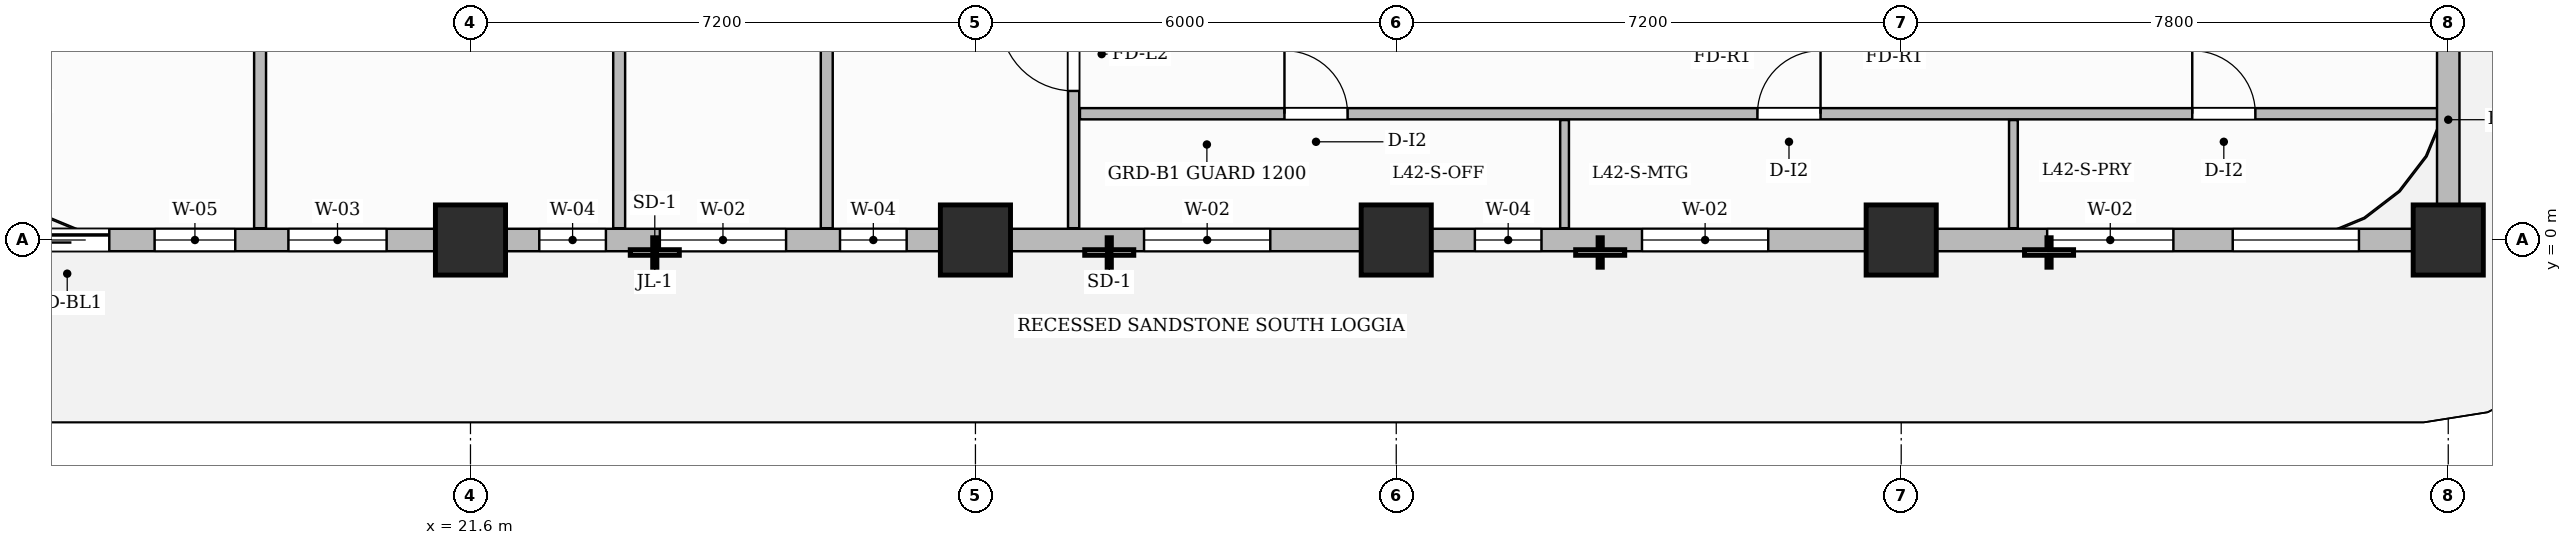
"""IFC4 building model, lengths in metres.
Left out: names, types, materials, properties, quantities, classifications, styles, units other than length and angle.
Written with IfcOpenShell. Run it as: python <this file> out.ifc"""

import sys

from ifc_helpers import new_model, si_unit, direction, frame, frame_2d, origin, origin_2d, place, context, subcontext, project, spatial, rectangle, extrude, source, transform, mapped, element, fill, save


model = new_model("IFC4")
c1 = context("Model", 3, precision=1e-05, world=origin(), true_north=direction((0.0, 1.0)))
c2 = subcontext(c1, "Body", "Model", "MODEL_VIEW")
j1 = project(units=[si_unit("LENGTHUNIT", "METRE"), si_unit("PLANEANGLEUNIT", "RADIAN")], contexts=[c1])
p1 = place(None, origin())
s1 = spatial("IfcSite", under=j1, at=p1, CompositionType="ELEMENT")
p2 = place(p1, origin())
s2 = spatial("IfcBuilding", under=s1, at=p2, CompositionType="ELEMENT")
p3 = place(p2, frame((0.0, 0.0, 169.55)))
s3 = spatial("IfcBuildingStorey", under=s2, at=p3, CompositionType="ELEMENT", Elevation=169.55)
m1 = source(origin(), c2, "Body", "SweptSolid", [
    extrude(rectangle(XDim=1.0, YDim=1.0, at=origin_2d()), origin(), (0.0, 0.0, 1.0), 3.85),
])
for number, where, z_axis, x_axis in (
    (1, (21.6, 0.0, 0.0), (0.0, 0.0, 1.0), (1.0, 0.0, 0.0)),
    (2, (28.8, 0.0, 0.0), (0.0, 0.0, 1.0), (1.0, 0.0, 0.0)),
    (3, (34.8, 0.0, 0.0), (0.0, 0.0, 1.0), (1.0, 0.0, 0.0)),
    (4, (42.0, 0.0, 0.0), (0.0, 0.0, 1.0), (1.0, 0.0, 0.0)),
    (5, (49.8, 0.0, 0.0), (0.0, 0.0, 1.0), (1.0, 0.0, 0.0)),
):
    element("IfcColumn", number, at=place(p3, frame(where, z_axis=z_axis, x_axis=x_axis)), inside=s3, PredefinedType="COLUMN", context=c2, shape_type="MappedRepresentation", body=[
        mapped(m1, transform((0.0, 0.0, 0.0), scale=1.0)),
    ])
p4 = place(p3, frame((30.2, 0.168, 0.0), z_axis=(0.0, 0.0, 1.0), x_axis=(0.0, 1.0, 0.0)))
e6 = element("IfcWall", 6, at=p4, inside=s3, PredefinedType="PARTITIONING", context=c2, shape_type="SweptSolid", body=[
    extrude(rectangle(XDim=8.892, YDim=0.16, at=frame_2d((4.446, 0.0))), origin(), (0.0, 0.0, 1.0), 3.6),
])
p5 = place(p4, frame((1.957, 0.0, 0.0)))
e7 = element("IfcOpeningElement", 7, at=p5, cuts=e6, PredefinedType="OPENING", context=c2, shape_type="SweptSolid", body=[
    extrude(rectangle(XDim=1.05, YDim=2.15, at=frame_2d((0.525, 1.075))), frame((0.0, 0.09, 0.0), z_axis=(0.0, -1.0, 0.0), x_axis=(1.0, 0.0, 0.0)), (0.0, 0.0, 1.0), 0.18),
])
p6 = place(p3, frame((30.29, 1.8, 0.0), z_axis=(0.0, 0.0, 1.0), x_axis=(1.0, 0.0, 0.0)))
e8 = element("IfcWall", 8, at=p6, inside=s3, PredefinedType="PARTITIONING", context=c2, shape_type="SweptSolid", body=[
    extrude(rectangle(XDim=19.37, YDim=0.16, at=frame_2d((9.685, 0.0))), origin(), (0.0, 0.0, 1.0), 3.6),
])
p7 = place(p6, frame((2.916, 0.0, 0.0)))
e9 = element("IfcOpeningElement", 9, at=p7, cuts=e8, PredefinedType="OPENING", context=c2, shape_type="SweptSolid", body=[
    extrude(rectangle(XDim=0.9, YDim=2.15, at=frame_2d((0.45, 1.075))), frame((0.0, 0.09, 0.0), z_axis=(0.0, -1.0, 0.0), x_axis=(1.0, 0.0, 0.0)), (0.0, 0.0, 1.0), 0.18),
])
p8 = place(p6, frame((9.66, 0.0, 0.0)))
e10 = element("IfcOpeningElement", 10, at=p8, cuts=e8, PredefinedType="OPENING", context=c2, shape_type="SweptSolid", body=[
    extrude(rectangle(XDim=0.9, YDim=2.15, at=frame_2d((0.45, 1.075))), frame((0.0, 0.09, 0.0), z_axis=(0.0, -1.0, 0.0), x_axis=(1.0, 0.0, 0.0)), (0.0, 0.0, 1.0), 0.18),
])
p9 = place(p6, frame((15.86, 0.0, 0.0)))
e11 = element("IfcOpeningElement", 11, at=p9, cuts=e8, PredefinedType="OPENING", context=c2, shape_type="SweptSolid", body=[
    extrude(rectangle(XDim=0.9, YDim=2.15, at=frame_2d((0.45, 1.075))), frame((0.0, 0.09, 0.0), z_axis=(0.0, -1.0, 0.0), x_axis=(1.0, 0.0, 0.0)), (0.0, 0.0, 1.0), 0.18),
])
for number, where, z_axis, x_axis in (
    (12, (37.2, 0.168, 0.0), (0.0, 0.0, 1.0), (0.0, 1.0, 0.0)),
    (13, (43.6, 0.168, 0.0), (0.0, 0.0, 1.0), (0.0, 1.0, 0.0)),
):
    element("IfcWall", number, at=place(p3, frame(where, z_axis=z_axis, x_axis=x_axis)), inside=s3, PredefinedType="PARTITIONING", context=c2, shape_type="SweptSolid", body=[
        extrude(rectangle(XDim=1.542, YDim=0.125, at=frame_2d((0.771, 0.0))), origin(), (0.0, 0.0, 1.0), 3.6),
    ])
for number, where, z_axis, x_axis in (
    (14, (18.6, 0.168, 0.0), (0.0, 0.0, 1.0), (0.0, 1.0, 0.0)),
    (15, (23.72, 0.168, 0.0), (0.0, 0.0, 1.0), (0.0, 1.0, 0.0)),
    (16, (26.68, 0.168, 0.0), (0.0, 0.0, 1.0), (0.0, 1.0, 0.0)),
):
    element("IfcWall", number, at=place(p3, frame(where, z_axis=z_axis, x_axis=x_axis)), inside=s3, PredefinedType="PARTITIONING", context=c2, shape_type="SweptSolid", body=[
        extrude(rectangle(XDim=8.892, YDim=0.17, at=frame_2d((4.446, 0.0))), origin(), (0.0, 0.0, 1.0), 3.6),
    ])
p10 = place(p3, frame((14.4, 0.0, 0.0), z_axis=(0.0, 0.0, 1.0), x_axis=(1.0, 0.0, 0.0)))
e17 = element("IfcWall", 17, at=p10, inside=s3, PredefinedType="SOLIDWALL", context=c2, shape_type="SweptSolid", body=[
    extrude(rectangle(XDim=35.4, YDim=0.32, at=frame_2d((17.7, 0.0))), origin(), (0.0, 0.0, 1.0), 3.085),
])
p11 = place(p10, frame((0.85, 0.0, 0.0)))
e18 = element("IfcOpeningElement", 18, at=p11, cuts=e17, PredefinedType="OPENING", context=c2, shape_type="SweptSolid", body=[
    extrude(rectangle(XDim=1.2, YDim=2.2, at=frame_2d((0.6, 1.1))), frame((0.0, 0.17, 0.0), z_axis=(0.0, -1.0, 0.0), x_axis=(1.0, 0.0, 0.0)), (0.0, 0.0, 1.0), 0.34),
])
p12 = place(p10, frame((2.696, 0.0, 0.8)))
e19 = element("IfcOpeningElement", 19, at=p12, cuts=e17, PredefinedType="OPENING", context=c2, shape_type="SweptSolid", body=[
    extrude(rectangle(XDim=1.15, YDim=1.8, at=frame_2d((0.575, 0.9))), frame((0.0, 0.17, 0.0), z_axis=(0.0, -1.0, 0.0), x_axis=(1.0, 0.0, 0.0)), (0.0, 0.0, 1.0), 0.34),
])
p13 = place(p10, frame((4.604, 0.0, 0.8)))
e20 = element("IfcOpeningElement", 20, at=p13, cuts=e17, PredefinedType="OPENING", context=c2, shape_type="SweptSolid", body=[
    extrude(rectangle(XDim=1.4, YDim=1.85, at=frame_2d((0.7, 0.925))), frame((0.0, 0.17, 0.0), z_axis=(0.0, -1.0, 0.0), x_axis=(1.0, 0.0, 0.0)), (0.0, 0.0, 1.0), 0.34),
])
p14 = place(p10, frame((8.181, 0.0, 0.8)))
e21 = element("IfcOpeningElement", 21, at=p14, cuts=e17, PredefinedType="OPENING", context=c2, shape_type="SweptSolid", body=[
    extrude(rectangle(XDim=0.95, YDim=1.75, at=frame_2d((0.475, 0.875))), frame((0.0, 0.17, 0.0), z_axis=(0.0, -1.0, 0.0), x_axis=(1.0, 0.0, 0.0)), (0.0, 0.0, 1.0), 0.34),
])
p15 = place(p10, frame((9.9, 0.0, 0.8)))
e22 = element("IfcOpeningElement", 22, at=p15, cuts=e17, PredefinedType="OPENING", context=c2, shape_type="SweptSolid", body=[
    extrude(rectangle(XDim=1.8, YDim=1.85, at=frame_2d((0.9, 0.925))), frame((0.0, 0.17, 0.0), z_axis=(0.0, -1.0, 0.0), x_axis=(1.0, 0.0, 0.0)), (0.0, 0.0, 1.0), 0.34),
])
p16 = place(p10, frame((12.469, 0.0, 0.8)))
e23 = element("IfcOpeningElement", 23, at=p16, cuts=e17, PredefinedType="OPENING", context=c2, shape_type="SweptSolid", body=[
    extrude(rectangle(XDim=0.95, YDim=1.75, at=frame_2d((0.475, 0.875))), frame((0.0, 0.17, 0.0), z_axis=(0.0, -1.0, 0.0), x_axis=(1.0, 0.0, 0.0)), (0.0, 0.0, 1.0), 0.34),
])
p17 = place(p10, frame((16.804, 0.0, 0.8)))
e24 = element("IfcOpeningElement", 24, at=p17, cuts=e17, PredefinedType="OPENING", context=c2, shape_type="SweptSolid", body=[
    extrude(rectangle(XDim=1.8, YDim=1.85, at=frame_2d((0.9, 0.925))), frame((0.0, 0.17, 0.0), z_axis=(0.0, -1.0, 0.0), x_axis=(1.0, 0.0, 0.0)), (0.0, 0.0, 1.0), 0.34),
])
p18 = place(p10, frame((21.521, 0.0, 0.8)))
e25 = element("IfcOpeningElement", 25, at=p18, cuts=e17, PredefinedType="OPENING", context=c2, shape_type="SweptSolid", body=[
    extrude(rectangle(XDim=0.95, YDim=1.75, at=frame_2d((0.475, 0.875))), frame((0.0, 0.17, 0.0), z_axis=(0.0, -1.0, 0.0), x_axis=(1.0, 0.0, 0.0)), (0.0, 0.0, 1.0), 0.34),
])
p19 = place(p10, frame((23.904, 0.0, 0.8)))
e26 = element("IfcOpeningElement", 26, at=p19, cuts=e17, PredefinedType="OPENING", context=c2, shape_type="SweptSolid", body=[
    extrude(rectangle(XDim=1.8, YDim=1.85, at=frame_2d((0.9, 0.925))), frame((0.0, 0.17, 0.0), z_axis=(0.0, -1.0, 0.0), x_axis=(1.0, 0.0, 0.0)), (0.0, 0.0, 1.0), 0.34),
])
p20 = place(p10, frame((29.681, 0.0, 0.8)))
e27 = element("IfcOpeningElement", 27, at=p20, cuts=e17, PredefinedType="OPENING", context=c2, shape_type="SweptSolid", body=[
    extrude(rectangle(XDim=1.8, YDim=1.85, at=frame_2d((0.9, 0.925))), frame((0.0, 0.17, 0.0), z_axis=(0.0, -1.0, 0.0), x_axis=(1.0, 0.0, 0.0)), (0.0, 0.0, 1.0), 0.34),
])
p21 = place(p10, frame((32.327, 0.0, 0.8)))
e28 = element("IfcOpeningElement", 28, at=p21, cuts=e17, PredefinedType="OPENING", context=c2, shape_type="SweptSolid", body=[
    extrude(rectangle(XDim=1.8, YDim=1.85, at=frame_2d((0.9, 0.925))), frame((0.0, 0.17, 0.0), z_axis=(0.0, -1.0, 0.0), x_axis=(1.0, 0.0, 0.0)), (0.0, 0.0, 1.0), 0.34),
])
p22 = place(p3, frame((49.8, 0.05, 0.0), z_axis=(0.0, 0.0, 1.0), x_axis=(0.0, 1.0, 0.0)))
e29 = element("IfcWall", 29, at=p22, inside=s3, PredefinedType="SOLIDWALL", context=c2, shape_type="SweptSolid", body=[
    extrude(rectangle(XDim=3.33, YDim=0.32, at=frame_2d((1.665, 0.0))), origin(), (0.0, 0.0, 1.0), 3.6),
])
m2 = source(origin(), c2, "Body", "SweptSolid", [
    extrude(rectangle(XDim=1.05, YDim=2.15, at=frame_2d((0.525, 1.075))), frame((0.0, 0.025, 0.0), z_axis=(0.0, -1.0, 0.0), x_axis=(1.0, 0.0, 0.0)), (0.0, 0.0, 1.0), 0.05),
])
p23 = place(p5, origin())
e30 = element("IfcDoor", 30, at=p23, inside=s3, OperationType="SINGLE_SWING_RIGHT", PredefinedType="DOOR", context=c2, shape_type="MappedRepresentation", body=[
    mapped(m2, transform((0.0, 0.0, 0.0), scale=1.0)),
])
fill(e7, e30)
m3 = source(origin(), c2, "Body", "SweptSolid", [
    extrude(rectangle(XDim=0.9, YDim=2.15, at=frame_2d((0.45, 1.075))), frame((0.0, 0.025, 0.0), z_axis=(0.0, -1.0, 0.0), x_axis=(1.0, 0.0, 0.0)), (0.0, 0.0, 1.0), 0.05),
])
p24 = place(p7, origin())
e31 = element("IfcDoor", 31, at=p24, inside=s3, OperationType="SINGLE_SWING_LEFT", PredefinedType="DOOR", context=c2, shape_type="MappedRepresentation", body=[
    mapped(m3, transform((0.0, 0.0, 0.0), scale=1.0)),
])
fill(e9, e31)
p25 = place(p8, origin())
e32 = element("IfcDoor", 32, at=p25, inside=s3, OperationType="SINGLE_SWING_RIGHT", PredefinedType="DOOR", context=c2, shape_type="MappedRepresentation", body=[
    mapped(m3, transform((0.0, 0.0, 0.0), scale=1.0)),
])
fill(e10, e32)
p26 = place(p9, origin())
e33 = element("IfcDoor", 33, at=p26, inside=s3, OperationType="SINGLE_SWING_LEFT", PredefinedType="DOOR", context=c2, shape_type="MappedRepresentation", body=[
    mapped(m3, transform((0.0, 0.0, 0.0), scale=1.0)),
])
fill(e11, e33)
m4 = source(origin(), c2, "Body", "SweptSolid", [
    extrude(rectangle(XDim=1.2, YDim=2.2, at=frame_2d((0.6, 1.1))), frame((0.0, 0.025, 0.0), z_axis=(0.0, -1.0, 0.0), x_axis=(1.0, 0.0, 0.0)), (0.0, 0.0, 1.0), 0.05),
])
p27 = place(p11, origin())
e34 = element("IfcDoor", 34, at=p27, inside=s3, OperationType="SLIDING_TO_LEFT", PredefinedType="DOOR", context=c2, shape_type="MappedRepresentation", body=[
    mapped(m4, transform((0.0, 0.0, 0.0), scale=1.0)),
])
fill(e18, e34)
m5 = source(origin(), c2, "Body", "SweptSolid", [
    extrude(rectangle(XDim=1.15, YDim=1.8, at=frame_2d((0.575, 0.9))), frame((0.0, 0.03, 0.0), z_axis=(0.0, -1.0, 0.0), x_axis=(1.0, 0.0, 0.0)), (0.0, 0.0, 1.0), 0.06),
])
p28 = place(p12, origin())
e35 = element("IfcWindow", 35, at=p28, inside=s3, PartitioningType="SINGLE_PANEL", PredefinedType="WINDOW", context=c2, shape_type="MappedRepresentation", body=[
    mapped(m5, transform((0.0, 0.0, 0.0), scale=1.0)),
])
fill(e19, e35)
m6 = source(origin(), c2, "Body", "SweptSolid", [
    extrude(rectangle(XDim=1.4, YDim=1.85, at=frame_2d((0.7, 0.925))), frame((0.0, 0.03, 0.0), z_axis=(0.0, -1.0, 0.0), x_axis=(1.0, 0.0, 0.0)), (0.0, 0.0, 1.0), 0.06),
])
p29 = place(p13, origin())
e36 = element("IfcWindow", 36, at=p29, inside=s3, PartitioningType="SINGLE_PANEL", PredefinedType="WINDOW", context=c2, shape_type="MappedRepresentation", body=[
    mapped(m6, transform((0.0, 0.0, 0.0), scale=1.0)),
])
fill(e20, e36)
m7 = source(origin(), c2, "Body", "SweptSolid", [
    extrude(rectangle(XDim=0.95, YDim=1.75, at=frame_2d((0.475, 0.875))), frame((0.0, 0.03, 0.0), z_axis=(0.0, -1.0, 0.0), x_axis=(1.0, 0.0, 0.0)), (0.0, 0.0, 1.0), 0.06),
])
p30 = place(p14, origin())
e37 = element("IfcWindow", 37, at=p30, inside=s3, PartitioningType="SINGLE_PANEL", PredefinedType="WINDOW", context=c2, shape_type="MappedRepresentation", body=[
    mapped(m7, transform((0.0, 0.0, 0.0), scale=1.0)),
])
fill(e21, e37)
m8 = source(origin(), c2, "Body", "SweptSolid", [
    extrude(rectangle(XDim=1.8, YDim=1.85, at=frame_2d((0.9, 0.925))), frame((0.0, 0.03, 0.0), z_axis=(0.0, -1.0, 0.0), x_axis=(1.0, 0.0, 0.0)), (0.0, 0.0, 1.0), 0.06),
])
p31 = place(p15, origin())
e38 = element("IfcWindow", 38, at=p31, inside=s3, PartitioningType="DOUBLE_PANEL_VERTICAL", PredefinedType="WINDOW", context=c2, shape_type="MappedRepresentation", body=[
    mapped(m8, transform((0.0, 0.0, 0.0), scale=1.0)),
])
fill(e22, e38)
p32 = place(p16, origin())
e39 = element("IfcWindow", 39, at=p32, inside=s3, PartitioningType="SINGLE_PANEL", PredefinedType="WINDOW", context=c2, shape_type="MappedRepresentation", body=[
    mapped(m7, transform((0.0, 0.0, 0.0), scale=1.0)),
])
fill(e23, e39)
p33 = place(p17, origin())
e40 = element("IfcWindow", 40, at=p33, inside=s3, PartitioningType="DOUBLE_PANEL_VERTICAL", PredefinedType="WINDOW", context=c2, shape_type="MappedRepresentation", body=[
    mapped(m8, transform((0.0, 0.0, 0.0), scale=1.0)),
])
fill(e24, e40)
p34 = place(p18, origin())
e41 = element("IfcWindow", 41, at=p34, inside=s3, PartitioningType="SINGLE_PANEL", PredefinedType="WINDOW", context=c2, shape_type="MappedRepresentation", body=[
    mapped(m7, transform((0.0, 0.0, 0.0), scale=1.0)),
])
fill(e25, e41)
p35 = place(p19, origin())
e42 = element("IfcWindow", 42, at=p35, inside=s3, PartitioningType="DOUBLE_PANEL_VERTICAL", PredefinedType="WINDOW", context=c2, shape_type="MappedRepresentation", body=[
    mapped(m8, transform((0.0, 0.0, 0.0), scale=1.0)),
])
fill(e26, e42)
p36 = place(p20, origin())
e43 = element("IfcWindow", 43, at=p36, inside=s3, PartitioningType="DOUBLE_PANEL_VERTICAL", PredefinedType="WINDOW", context=c2, shape_type="MappedRepresentation", body=[
    mapped(m8, transform((0.0, 0.0, 0.0), scale=1.0)),
])
fill(e27, e43)
p37 = place(p21, origin())
e44 = element("IfcWindow", 44, at=p37, inside=s3, PartitioningType="DOUBLE_PANEL_VERTICAL", PredefinedType="WINDOW", context=c2, shape_type="MappedRepresentation", body=[
    mapped(m8, transform((0.0, 0.0, 0.0), scale=1.0)),
])
fill(e28, e44)
save(model, sys.argv[1])
